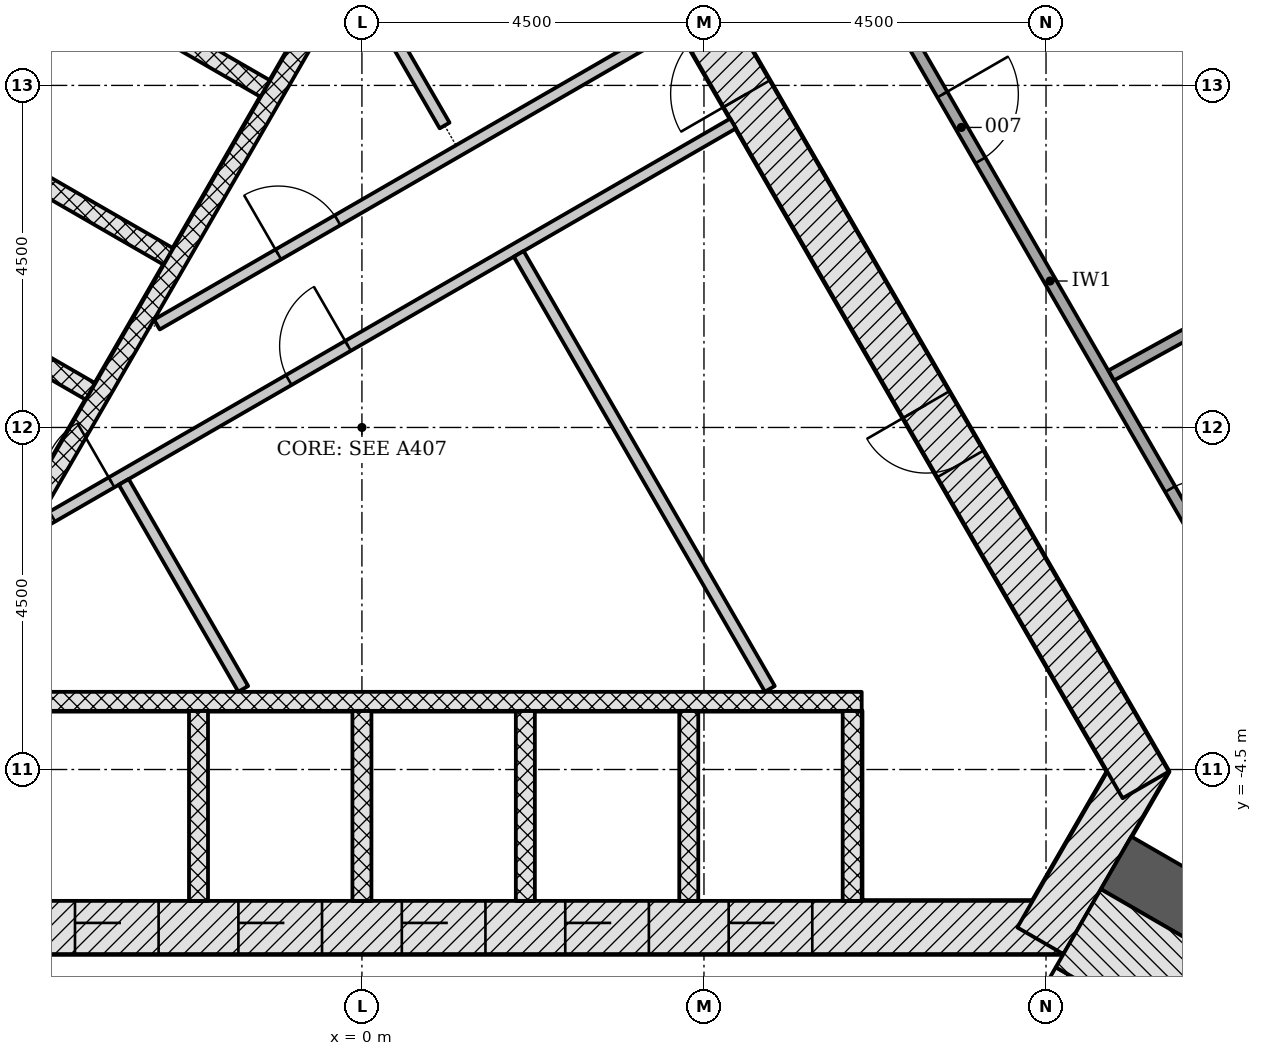
"""IFC4 building model, lengths in metres.
Left out: names, types, materials, properties, quantities, classifications, styles, units other than length and angle.
Written with IfcOpenShell. Run it as: python <this file> out.ifc"""

import sys

from ifc_helpers import new_model, si_unit, direction, frame, frame_2d, origin, place, context, subcontext, project, spatial, rectangle, extrude, element, fill, save


model = new_model("IFC4")
c1 = context("Model", 3, precision=1e-05, world=origin(), true_north=direction((0.0, 1.0)))
c2 = subcontext(c1, "Body", "Model", "MODEL_VIEW")
j1 = project(units=[si_unit("LENGTHUNIT", "METRE"), si_unit("PLANEANGLEUNIT", "RADIAN")], contexts=[c1])
p1 = place(None, origin())
s1 = spatial("IfcSite", under=j1, at=p1, CompositionType="ELEMENT")
p2 = place(p1, origin())
s2 = spatial("IfcBuilding", under=s1, at=p2, CompositionType="ELEMENT")
p3 = place(p2, frame((0.0, 0.0, 109.5)))
s3 = spatial("IfcBuildingStorey", under=s2, at=p3, CompositionType="ELEMENT", Elevation=109.5)
p4 = place(p3, frame((-9.229, -6.578, -0.2), z_axis=(0.0, 0.0, 1.0), x_axis=(1.0, 0.0, 0.0)))
e1 = element("IfcWall", 1, at=p4, inside=s3, PredefinedType="SHEAR", context=c2, shape_type="SweptSolid", body=[
    extrude(rectangle(XDim=18.458, YDim=0.7, at=frame_2d((9.229, 0.0))), origin(), (0.0, 0.0, 1.0), 3.6),
])
p5 = place(p4, frame((3.304, 0.0, 0.2)))
e2 = element("IfcOpeningElement", 2, at=p5, cuts=e1, PredefinedType="OPENING", context=c2, shape_type="SweptSolid", body=[
    extrude(rectangle(XDim=1.1, YDim=2.1, at=frame_2d((0.55, 1.05))), frame((0.0, 0.36, 0.0), z_axis=(0.0, -1.0, 0.0), x_axis=(1.0, 0.0, 0.0)), (0.0, 0.0, 1.0), 0.72),
])
p6 = place(p4, frame((5.454, 0.0, 0.2)))
e3 = element("IfcOpeningElement", 3, at=p6, cuts=e1, PredefinedType="OPENING", context=c2, shape_type="SweptSolid", body=[
    extrude(rectangle(XDim=1.1, YDim=2.1, at=frame_2d((0.55, 1.05))), frame((0.0, 0.36, 0.0), z_axis=(0.0, -1.0, 0.0), x_axis=(1.0, 0.0, 0.0)), (0.0, 0.0, 1.0), 0.72),
])
p7 = place(p4, frame((7.604, 0.0, 0.2)))
e4 = element("IfcOpeningElement", 4, at=p7, cuts=e1, PredefinedType="OPENING", context=c2, shape_type="SweptSolid", body=[
    extrude(rectangle(XDim=1.1, YDim=2.1, at=frame_2d((0.55, 1.05))), frame((0.0, 0.36, 0.0), z_axis=(0.0, -1.0, 0.0), x_axis=(1.0, 0.0, 0.0)), (0.0, 0.0, 1.0), 0.72),
])
p8 = place(p4, frame((9.754, 0.0, 0.2)))
e5 = element("IfcOpeningElement", 5, at=p8, cuts=e1, PredefinedType="OPENING", context=c2, shape_type="SweptSolid", body=[
    extrude(rectangle(XDim=1.1, YDim=2.1, at=frame_2d((0.55, 1.05))), frame((0.0, 0.36, 0.0), z_axis=(0.0, -1.0, 0.0), x_axis=(1.0, 0.0, 0.0)), (0.0, 0.0, 1.0), 0.72),
])
p9 = place(p4, frame((11.904, 0.0, 0.2)))
e6 = element("IfcOpeningElement", 6, at=p9, cuts=e1, PredefinedType="OPENING", context=c2, shape_type="SweptSolid", body=[
    extrude(rectangle(XDim=1.1, YDim=2.1, at=frame_2d((0.55, 1.05))), frame((0.0, 0.36, 0.0), z_axis=(0.0, -1.0, 0.0), x_axis=(1.0, 0.0, 0.0)), (0.0, 0.0, 1.0), 0.72),
])
p10 = place(p4, frame((14.054, 0.0, 0.2)))
e7 = element("IfcOpeningElement", 7, at=p10, cuts=e1, PredefinedType="OPENING", context=c2, shape_type="SweptSolid", body=[
    extrude(rectangle(XDim=1.1, YDim=2.1, at=frame_2d((0.55, 1.05))), frame((0.0, 0.36, 0.0), z_axis=(0.0, -1.0, 0.0), x_axis=(1.0, 0.0, 0.0)), (0.0, 0.0, 1.0), 0.72),
])
p11 = place(p4, frame((1.029, 0.0, 0.2)))
e8 = element("IfcOpeningElement", 8, at=p11, cuts=e1, PredefinedType="OPENING", context=c2, shape_type="SweptSolid", body=[
    extrude(rectangle(XDim=1.0, YDim=2.1, at=frame_2d((0.5, 1.05))), frame((0.0, 0.36, 0.0), z_axis=(0.0, -1.0, 0.0), x_axis=(1.0, 0.0, 0.0)), (0.0, 0.0, 1.0), 0.72),
])
p12 = place(p3, frame((8.926, -6.753, -0.2), z_axis=(0.0, 0.0, 1.0), x_axis=(0.500042739161, 0.866000726912, 0.0)))
e9 = element("IfcWall", 9, at=p12, inside=s3, PredefinedType="SHEAR", context=c2, shape_type="SweptSolid", body=[
    extrude(rectangle(XDim=2.771, YDim=0.7, at=frame_2d((1.386, 0.0))), origin(), (0.0, 0.0, 1.0), 3.6),
])
p13 = place(p3, frame((10.311, -4.703, -0.2), z_axis=(0.0, 0.0, 1.0), x_axis=(-0.500001446645, 0.866024568562, 0.0)))
e10 = element("IfcWall", 10, at=p13, inside=s3, PredefinedType="SHEAR", context=c2, shape_type="SweptSolid", body=[
    extrude(rectangle(XDim=18.458, YDim=0.7, at=frame_2d((9.229, 0.0))), origin(), (0.0, 0.0, 1.0), 3.6),
])
p14 = place(p13, frame((10.5, 0.0, 0.2)))
e11 = element("IfcOpeningElement", 11, at=p14, cuts=e10, PredefinedType="OPENING", context=c2, shape_type="SweptSolid", body=[
    extrude(rectangle(XDim=1.0, YDim=2.1, at=frame_2d((0.5, 1.05))), frame((0.0, 0.36, 0.0), z_axis=(0.0, -1.0, 0.0), x_axis=(1.0, 0.0, 0.0)), (0.0, 0.0, 1.0), 0.72),
])
p15 = place(p13, frame((4.877, 0.0, 0.2)))
e12 = element("IfcOpeningElement", 12, at=p15, cuts=e10, PredefinedType="OPENING", context=c2, shape_type="SweptSolid", body=[
    extrude(rectangle(XDim=0.9, YDim=2.1, at=frame_2d((0.45, 1.05))), frame((0.0, 0.36, 0.0), z_axis=(0.0, -1.0, 0.0), x_axis=(1.0, 0.0, 0.0)), (0.0, 0.0, 1.0), 0.72),
])
p16 = place(p13, frame((14.452, 0.0, 0.2)))
e13 = element("IfcOpeningElement", 13, at=p16, cuts=e10, PredefinedType="OPENING", context=c2, shape_type="SweptSolid", body=[
    extrude(rectangle(XDim=0.9, YDim=2.1, at=frame_2d((0.45, 1.05))), frame((0.0, 0.36, 0.0), z_axis=(0.0, -1.0, 0.0), x_axis=(1.0, 0.0, 0.0)), (0.0, 0.0, 1.0), 0.72),
])
p17 = place(p3, frame((-1.083, 11.281, -0.2), z_axis=(0.0, 0.0, 1.0), x_axis=(-0.500001446645, -0.866024568562, 0.0)))
e14 = element("IfcWall", 14, at=p17, inside=s3, PredefinedType="SHEAR", context=c2, shape_type="SweptSolid", body=[
    extrude(rectangle(XDim=18.458, YDim=0.7, at=frame_2d((9.229, 0.0))), origin(), (0.0, 0.0, 1.0), 3.6),
])
p18 = place(p17, frame((8.979, 0.0, 0.2)))
e15 = element("IfcOpeningElement", 15, at=p18, cuts=e14, PredefinedType="OPENING", context=c2, shape_type="SweptSolid", body=[
    extrude(rectangle(XDim=1.2, YDim=2.1, at=frame_2d((0.6, 1.05))), frame((0.0, 0.36, 0.0), z_axis=(0.0, -1.0, 0.0), x_axis=(1.0, 0.0, 0.0)), (0.0, 0.0, 1.0), 0.72),
])
p19 = place(p17, frame((11.029, 0.0, 0.2)))
e16 = element("IfcOpeningElement", 16, at=p19, cuts=e14, PredefinedType="OPENING", context=c2, shape_type="SweptSolid", body=[
    extrude(rectangle(XDim=1.2, YDim=2.1, at=frame_2d((0.6, 1.05))), frame((0.0, 0.36, 0.0), z_axis=(0.0, -1.0, 0.0), x_axis=(1.0, 0.0, 0.0)), (0.0, 0.0, 1.0), 0.72),
])
p20 = place(p3, frame((9.922, -5.728, -0.2), z_axis=(0.0, 0.0, 1.0), x_axis=(0.866027307971, -0.499996701837, 0.0)))
e17 = element("IfcWall", 17, at=p20, inside=s3, PredefinedType="SHEAR", context=c2, shape_type="SweptSolid", body=[
    extrude(rectangle(XDim=11.918, YDim=0.8, at=frame_2d((5.959, 0.0))), origin(), (0.0, 0.0, 1.0), 3.6),
])
for number, where, z_axis, x_axis in (
    (18, (-2.15, -6.228, -0.2), (0.0, 0.0, 1.0), (0.0, 1.0, 0.0)),
    (19, (0.0, -6.228, -0.2), (0.0, 0.0, 1.0), (0.0, 1.0, 0.0)),
    (20, (2.15, -6.228, -0.2), (0.0, 0.0, 1.0), (0.0, 1.0, 0.0)),
    (21, (4.3, -6.228, -0.2), (0.0, 0.0, 1.0), (0.0, 1.0, 0.0)),
    (22, (6.45, -6.228, -0.2), (0.0, 0.0, 1.0), (0.0, 1.0, 0.0)),
):
    element("IfcWall", number, at=place(p3, frame(where, z_axis=z_axis, x_axis=x_axis)), inside=s3, PredefinedType="PARTITIONING", context=c2, shape_type="SweptSolid", body=[
        extrude(rectangle(XDim=2.5, YDim=0.25, at=frame_2d((1.25, 0.0))), origin(), (0.0, 0.0, 1.0), 3.6),
    ])
p21 = place(p3, frame((-6.575, -3.603, 0.0), z_axis=(0.0, 0.0, 1.0), x_axis=(1.0, 0.0, 0.0)))
e23 = element("IfcWall", 23, at=p21, inside=s3, PredefinedType="PARTITIONING", context=c2, shape_type="SweptSolid", body=[
    extrude(rectangle(XDim=13.15, YDim=0.25, at=frame_2d((6.575, 0.0))), origin(), (0.0, 0.0, 1.0), 3.4),
])
for number, where, z_axis, x_axis in (
    (24, (-3.781, 5.907, -0.2), (0.0, 0.0, 1.0), (0.866, -0.5, 0.0)),
    (25, (-5.056, 3.699, -0.2), (0.0, 0.0, 1.0), (0.866, -0.5, 0.0)),
    (26, (-6.081, 1.923, -0.2), (0.0, 0.0, 1.0), (0.866, -0.5, 0.0)),
):
    element("IfcWall", number, at=place(p3, frame(where, z_axis=z_axis, x_axis=x_axis)), inside=s3, PredefinedType="PARTITIONING", context=c2, shape_type="SweptSolid", body=[
        extrude(rectangle(XDim=2.9, YDim=0.25, at=frame_2d((1.45, 0.0))), origin(), (0.0, 0.0, 1.0), 3.6),
    ])
p22 = place(p3, frame((0.176, 6.711, 0.0), z_axis=(0.0, 0.0, 1.0), x_axis=(-0.500004227369, -0.866022963098, 0.0)))
e27 = element("IfcWall", 27, at=p22, inside=s3, PredefinedType="PARTITIONING", context=c2, shape_type="SweptSolid", body=[
    extrude(rectangle(XDim=11.8, YDim=0.25, at=frame_2d((5.9, 0.0))), origin(), (0.0, 0.0, 1.0), 3.4),
])
p23 = place(p3, frame((-4.198, -1.244, 0.0), z_axis=(0.0, 0.0, 1.0), x_axis=(0.866020798945, 0.500007975732, 0.0)))
e28 = element("IfcWall", 28, at=p23, inside=s3, PredefinedType="PARTITIONING", context=c2, shape_type="SweptSolid", body=[
    extrude(rectangle(XDim=10.486, YDim=0.15, at=frame_2d((5.243, 0.0))), origin(), (0.0, 0.0, 1.0), 3.4),
])
p24 = place(p23, frame((3.736, 0.0, 0.0)))
e29 = element("IfcOpeningElement", 29, at=p24, cuts=e28, PredefinedType="OPENING", context=c2, shape_type="SweptSolid", body=[
    extrude(rectangle(XDim=0.9, YDim=2.1, at=frame_2d((0.45, 1.05))), frame((0.0, 0.085, 0.0), z_axis=(0.0, -1.0, 0.0), x_axis=(1.0, 0.0, 0.0)), (0.0, 0.0, 1.0), 0.17),
])
p25 = place(p23, frame((0.144, 0.0, 0.0)))
e30 = element("IfcOpeningElement", 30, at=p25, cuts=e28, PredefinedType="OPENING", context=c2, shape_type="SweptSolid", body=[
    extrude(rectangle(XDim=0.9, YDim=2.1, at=frame_2d((0.45, 1.05))), frame((0.0, 0.085, 0.0), z_axis=(0.0, -1.0, 0.0), x_axis=(1.0, 0.0, 0.0)), (0.0, 0.0, 1.0), 0.17),
])
p26 = place(p3, frame((5.367, -3.439, 0.0), z_axis=(0.0, 0.0, 1.0), x_axis=(-0.499981499682, 0.866036084685, 0.0)))
e31 = element("IfcWall", 31, at=p26, inside=s3, PredefinedType="PARTITIONING", context=c2, shape_type="SweptSolid", body=[
    extrude(rectangle(XDim=6.608, YDim=0.15, at=frame_2d((3.304, 0.0))), origin(), (0.0, 0.0, 1.0), 3.4),
])
p27 = place(p3, frame((-1.561, -3.439, 0.0), z_axis=(0.0, 0.0, 1.0), x_axis=(-0.499989077369, 0.866031709877, 0.0)))
e32 = element("IfcWall", 32, at=p27, inside=s3, PredefinedType="PARTITIONING", context=c2, shape_type="SweptSolid", body=[
    extrude(rectangle(XDim=3.144, YDim=0.15, at=frame_2d((1.572, 0.0))), origin(), (0.0, 0.0, 1.0), 3.4),
])
p28 = place(p3, frame((-2.698, 1.354, 0.0), z_axis=(0.0, 0.0, 1.0), x_axis=(0.866021157486, 0.500007354732, 0.0)))
e33 = element("IfcWall", 33, at=p28, inside=s3, PredefinedType="PARTITIONING", context=c2, shape_type="SweptSolid", body=[
    extrude(rectangle(XDim=7.888, YDim=0.15, at=frame_2d((3.944, 0.0))), origin(), (0.0, 0.0, 1.0), 3.4),
])
p29 = place(p28, frame((1.845, 0.0, 0.0)))
e34 = element("IfcOpeningElement", 34, at=p29, cuts=e33, PredefinedType="OPENING", context=c2, shape_type="SweptSolid", body=[
    extrude(rectangle(XDim=0.9, YDim=2.1, at=frame_2d((0.45, 1.05))), frame((0.0, 0.085, 0.0), z_axis=(0.0, -1.0, 0.0), x_axis=(1.0, 0.0, 0.0)), (0.0, 0.0, 1.0), 0.17),
])
p30 = place(p3, frame((1.088, 3.972, 0.0), z_axis=(0.0, 0.0, 1.0), x_axis=(-0.500116913307, 0.865957893332, 0.0)))
e35 = element("IfcWall", 35, at=p30, inside=s3, PredefinedType="PARTITIONING", context=c2, shape_type="SweptSolid", body=[
    extrude(rectangle(XDim=2.304, YDim=0.15, at=frame_2d((1.152, 0.0))), origin(), (0.0, 0.0, 1.0), 3.4),
])
p31 = place(p3, frame((7.44, -10.226, -0.2), z_axis=(0.0, 0.0, 1.0), x_axis=(0.500022077904, 0.866012656725, 0.0)))
e36 = element("IfcWall", 36, at=p31, inside=s3, PredefinedType="SHEAR", context=c2, shape_type="SweptSolid", body=[
    extrude(rectangle(XDim=3.55, YDim=0.2, at=frame_2d((1.775, 0.0))), origin(), (0.0, 0.0, 1.0), 3.6),
])
p32 = place(p31, frame((1.175, 0.0, 0.2)))
e37 = element("IfcOpeningElement", 37, at=p32, cuts=e36, PredefinedType="OPENING", context=c2, shape_type="SweptSolid", body=[
    extrude(rectangle(XDim=1.2, YDim=2.1, at=frame_2d((0.6, 1.05))), frame((0.0, 0.11, 0.0), z_axis=(0.0, -1.0, 0.0), x_axis=(1.0, 0.0, 0.0)), (0.0, 0.0, 1.0), 0.22),
])
p33 = place(p3, frame((9.425, -6.588, -0.2), z_axis=(0.0, 0.0, 1.0), x_axis=(0.866018442252, -0.500012057535, 0.0)))
e38 = element("IfcWall", 38, at=p33, inside=s3, PredefinedType="SHEAR", context=c2, shape_type="SweptSolid", body=[
    extrude(rectangle(XDim=7.2, YDim=1.186, at=frame_2d((3.6, 0.0))), origin(), (0.0, 0.0, 1.0), 3.6),
])
p34 = place(p3, frame((5.289, 8.446, 0.0), z_axis=(0.0, 0.0, 1.0), x_axis=(0.499996620721, -0.866027354803, 0.0)))
e39 = element("IfcWall", 39, at=p34, inside=s3, PredefinedType="PARTITIONING", context=c2, shape_type="SweptSolid", body=[
    extrude(rectangle(XDim=15.057, YDim=0.15, at=frame_2d((7.528, 0.0))), origin(), (0.0, 0.0, 1.0), 2.847),
])
p35 = place(p34, frame((10.689, 0.0, 0.0)))
e40 = element("IfcOpeningElement", 40, at=p35, cuts=e39, PredefinedType="OPENING", context=c2, shape_type="SweptSolid", body=[
    extrude(rectangle(XDim=1.0, YDim=2.1, at=frame_2d((0.5, 1.05))), frame((0.0, 0.085, 0.0), z_axis=(0.0, -1.0, 0.0), x_axis=(1.0, 0.0, 0.0)), (0.0, 0.0, 1.0), 0.17),
])
p36 = place(p34, frame((4.695, 0.0, 0.0)))
e41 = element("IfcOpeningElement", 41, at=p36, cuts=e39, PredefinedType="OPENING", context=c2, shape_type="SweptSolid", body=[
    extrude(rectangle(XDim=1.0, YDim=2.1, at=frame_2d((0.5, 1.05))), frame((0.0, 0.085, 0.0), z_axis=(0.0, -1.0, 0.0), x_axis=(1.0, 0.0, 0.0)), (0.0, 0.0, 1.0), 0.17),
])
p37 = place(p3, frame((16.297, 4.232, 0.0), z_axis=(0.0, 0.0, 1.0), x_axis=(-0.875895262359, -0.482501284327, 0.0)))
e42 = element("IfcWall", 42, at=p37, inside=s3, PredefinedType="PARTITIONING", context=c2, shape_type="SweptSolid", body=[
    extrude(rectangle(XDim=7.351, YDim=0.15, at=frame_2d((3.676, 0.0))), origin(), (0.0, 0.0, 1.0), 2.847),
])
p38 = place(p6, origin())
e43 = element("IfcDoor", 43, at=p38, inside=s3, OperationType="DOUBLE_DOOR_SLIDING", PredefinedType="DOOR", context=c2, shape_type="SweptSolid", body=[
    extrude(rectangle(XDim=1.1, YDim=2.1, at=frame_2d((0.55, 1.05))), frame((0.0, 0.025, 0.0), z_axis=(0.0, -1.0, 0.0), x_axis=(1.0, 0.0, 0.0)), (0.0, 0.0, 1.0), 0.05),
])
fill(e3, e43)
p39 = place(p7, origin())
e44 = element("IfcDoor", 44, at=p39, inside=s3, OperationType="DOUBLE_DOOR_SLIDING", PredefinedType="DOOR", context=c2, shape_type="SweptSolid", body=[
    extrude(rectangle(XDim=1.1, YDim=2.1, at=frame_2d((0.55, 1.05))), frame((0.0, 0.025, 0.0), z_axis=(0.0, -1.0, 0.0), x_axis=(1.0, 0.0, 0.0)), (0.0, 0.0, 1.0), 0.05),
])
fill(e4, e44)
p40 = place(p8, origin())
e45 = element("IfcDoor", 45, at=p40, inside=s3, OperationType="DOUBLE_DOOR_SLIDING", PredefinedType="DOOR", context=c2, shape_type="SweptSolid", body=[
    extrude(rectangle(XDim=1.1, YDim=2.1, at=frame_2d((0.55, 1.05))), frame((0.0, 0.025, 0.0), z_axis=(0.0, -1.0, 0.0), x_axis=(1.0, 0.0, 0.0)), (0.0, 0.0, 1.0), 0.05),
])
fill(e5, e45)
p41 = place(p9, origin())
e46 = element("IfcDoor", 46, at=p41, inside=s3, OperationType="DOUBLE_DOOR_SLIDING", PredefinedType="DOOR", context=c2, shape_type="SweptSolid", body=[
    extrude(rectangle(XDim=1.1, YDim=2.1, at=frame_2d((0.55, 1.05))), frame((0.0, 0.025, 0.0), z_axis=(0.0, -1.0, 0.0), x_axis=(1.0, 0.0, 0.0)), (0.0, 0.0, 1.0), 0.05),
])
fill(e6, e46)
p42 = place(p10, origin())
e47 = element("IfcDoor", 47, at=p42, inside=s3, OperationType="DOUBLE_DOOR_SLIDING", PredefinedType="DOOR", context=c2, shape_type="SweptSolid", body=[
    extrude(rectangle(XDim=1.1, YDim=2.1, at=frame_2d((0.55, 1.05))), frame((0.0, 0.025, 0.0), z_axis=(0.0, -1.0, 0.0), x_axis=(1.0, 0.0, 0.0)), (0.0, 0.0, 1.0), 0.05),
])
fill(e7, e47)
p43 = place(p14, origin())
e48 = element("IfcDoor", 48, at=p43, inside=s3, OperationType="SINGLE_SWING_LEFT", PredefinedType="DOOR", context=c2, shape_type="SweptSolid", body=[
    extrude(rectangle(XDim=1.0, YDim=2.1, at=frame_2d((0.5, 1.05))), frame((0.0, 0.075, 0.0), z_axis=(0.0, -1.0, 0.0), x_axis=(1.0, 0.0, 0.0)), (0.0, 0.0, 1.0), 0.15),
])
fill(e11, e48)
p44 = place(p15, origin())
e49 = element("IfcDoor", 49, at=p44, inside=s3, OperationType="SINGLE_SWING_RIGHT", PredefinedType="DOOR", context=c2, shape_type="SweptSolid", body=[
    extrude(rectangle(XDim=0.9, YDim=2.1, at=frame_2d((0.45, 1.05))), frame((0.0, 0.075, 0.0), z_axis=(0.0, -1.0, 0.0), x_axis=(1.0, 0.0, 0.0)), (0.0, 0.0, 1.0), 0.15),
])
fill(e12, e49)
p45 = place(p24, origin())
e50 = element("IfcDoor", 50, at=p45, inside=s3, OperationType="SINGLE_SWING_RIGHT", PredefinedType="DOOR", context=c2, shape_type="SweptSolid", body=[
    extrude(rectangle(XDim=0.9, YDim=2.1, at=frame_2d((0.45, 1.05))), frame((0.0, 0.025, 0.0), z_axis=(0.0, -1.0, 0.0), x_axis=(1.0, 0.0, 0.0)), (0.0, 0.0, 1.0), 0.05),
])
fill(e29, e50)
p46 = place(p29, origin())
e51 = element("IfcDoor", 51, at=p46, inside=s3, OperationType="SINGLE_SWING_LEFT", PredefinedType="DOOR", context=c2, shape_type="SweptSolid", body=[
    extrude(rectangle(XDim=0.9, YDim=2.1, at=frame_2d((0.45, 1.05))), frame((0.0, 0.025, 0.0), z_axis=(0.0, -1.0, 0.0), x_axis=(1.0, 0.0, 0.0)), (0.0, 0.0, 1.0), 0.05),
])
fill(e34, e51)
p47 = place(p25, origin())
e52 = element("IfcDoor", 52, at=p47, inside=s3, OperationType="SINGLE_SWING_RIGHT", PredefinedType="DOOR", context=c2, shape_type="SweptSolid", body=[
    extrude(rectangle(XDim=0.9, YDim=2.1, at=frame_2d((0.45, 1.05))), frame((0.0, 0.025, 0.0), z_axis=(0.0, -1.0, 0.0), x_axis=(1.0, 0.0, 0.0)), (0.0, 0.0, 1.0), 0.05),
])
fill(e30, e52)
p48 = place(p35, origin())
e53 = element("IfcDoor", 53, at=p48, inside=s3, OperationType="SINGLE_SWING_RIGHT", PredefinedType="DOOR", context=c2, shape_type="SweptSolid", body=[
    extrude(rectangle(XDim=1.0, YDim=2.1, at=frame_2d((0.5, 1.05))), frame((0.0, 0.025, 0.0), z_axis=(0.0, -1.0, 0.0), x_axis=(1.0, 0.0, 0.0)), (0.0, 0.0, 1.0), 0.05),
])
fill(e40, e53)
p49 = place(p36, origin())
e54 = element("IfcDoor", 54, at=p49, inside=s3, OperationType="SINGLE_SWING_LEFT", PredefinedType="DOOR", context=c2, shape_type="SweptSolid", body=[
    extrude(rectangle(XDim=1.0, YDim=2.1, at=frame_2d((0.5, 1.05))), frame((0.0, 0.025, 0.0), z_axis=(0.0, -1.0, 0.0), x_axis=(1.0, 0.0, 0.0)), (0.0, 0.0, 1.0), 0.05),
])
fill(e41, e54)
save(model, sys.argv[1])
